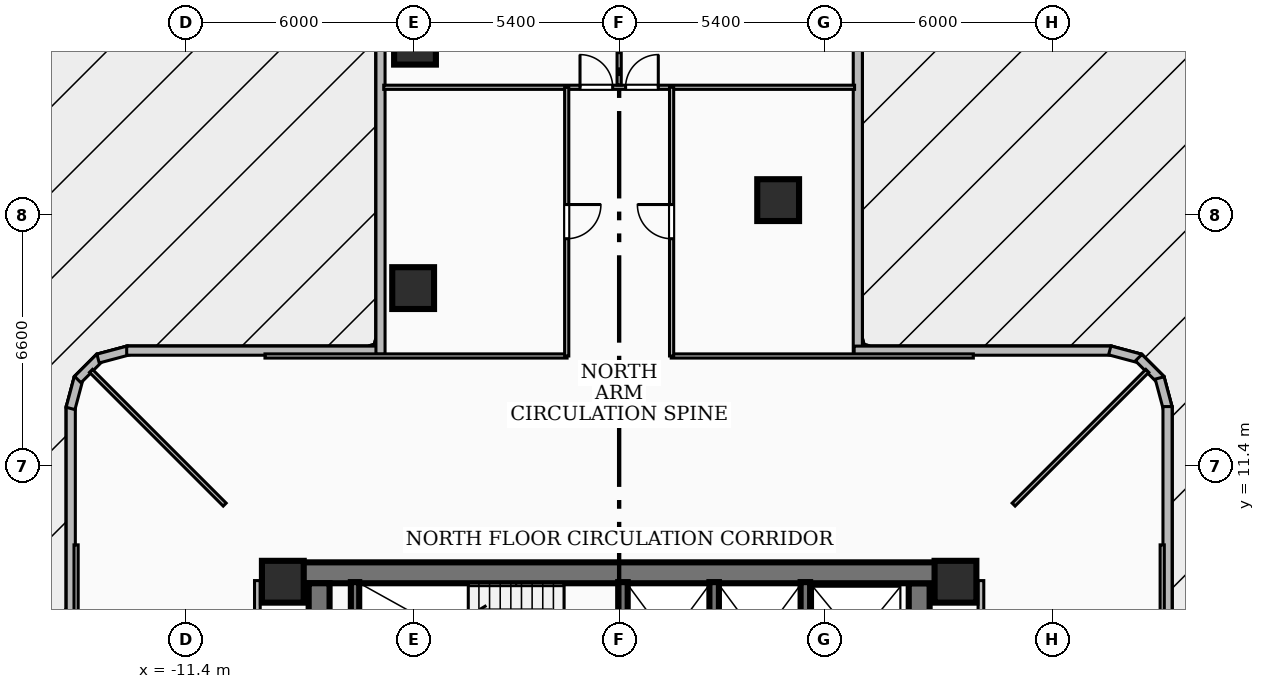
"""IFC4 building model, lengths in metres.
Left out: names, types, materials, properties, quantities, classifications, styles, units other than length and angle.
Written with IfcOpenShell. Run it as: python <this file> out.ifc"""

import sys

from ifc_helpers import new_model, si_unit, direction, frame, frame_2d, origin, origin_2d, place, context, subcontext, project, spatial, rectangle, extrude, element, fill, save


model = new_model("IFC4")
c1 = context("Model", 3, precision=1e-05, world=origin(), true_north=direction((0.0, 1.0)))
c2 = subcontext(c1, "Body", "Model", "MODEL_VIEW")
j1 = project(units=[si_unit("LENGTHUNIT", "METRE"), si_unit("PLANEANGLEUNIT", "RADIAN")], contexts=[c1])
p1 = place(None, origin())
s1 = spatial("IfcSite", under=j1, at=p1, CompositionType="ELEMENT")
p2 = place(p1, origin())
s2 = spatial("IfcBuilding", under=s1, at=p2, CompositionType="ELEMENT")
p3 = place(p2, frame((0.0, 0.0, 24.48)))
s3 = spatial("IfcBuildingStorey", under=s2, at=p3, CompositionType="ELEMENT", Elevation=24.48)
p4 = place(p3, frame((-8.78, 8.585, 0.0), z_axis=(0.0, 0.0, 1.0), x_axis=(1.0, 0.0, 0.0)))
e1 = element("IfcWall", 1, at=p4, inside=s3, PredefinedType="SHEAR", context=c2, shape_type="SweptSolid", body=[
    extrude(rectangle(XDim=17.56, YDim=0.55, at=frame_2d((8.78, 0.0))), origin(), (0.0, 0.0, 1.0), 3.34),
])
for number, where, z_axis, x_axis in (
    (2, (-7.895, 2.025, 0.0), (0.0, 0.0, 1.0), (0.0, 1.0, 0.0)),
    (3, (7.895, 8.31, 0.0), (0.0, 0.0, 1.0), (0.0, -1.0, 0.0)),
):
    element("IfcWall", number, at=place(p3, frame(where, z_axis=z_axis, x_axis=x_axis)), inside=s3, PredefinedType="SHEAR", context=c2, shape_type="SweptSolid", body=[
        extrude(rectangle(XDim=6.285, YDim=0.55, at=frame_2d((3.143, 0.0))), origin(), (0.0, 0.0, 1.0), 3.34),
    ])
p5 = place(p3, frame((-6.95, 5.28, 0.0), z_axis=(0.0, 0.0, 1.0), x_axis=(0.0, 1.0, 0.0)))
e4 = element("IfcWall", 4, at=p5, inside=s3, PredefinedType="SOLIDWALL", context=c2, shape_type="SweptSolid", body=[
    extrude(rectangle(XDim=3.06, YDim=0.22, at=frame_2d((1.53, 0.0))), origin(), (0.0, 0.0, 1.0), 3.34),
])
for number, where, z_axis, x_axis in (
    (5, (0.1, 5.3, 0.0), (0.0, 0.0, 1.0), (0.0, 1.0, 0.0)),
    (6, (2.5, 5.3, 0.0), (0.0, 0.0, 1.0), (0.0, 1.0, 0.0)),
    (7, (4.9, 5.3, 0.0), (0.0, 0.0, 1.0), (0.0, 1.0, 0.0)),
):
    element("IfcWall", number, at=place(p3, frame(where, z_axis=z_axis, x_axis=x_axis)), inside=s3, PredefinedType="SOLIDWALL", context=c2, shape_type="SweptSolid", body=[
        extrude(rectangle(XDim=3.04, YDim=0.25, at=frame_2d((1.52, 0.0))), origin(), (0.0, 0.0, 1.0), 3.34),
    ])
for number, where, z_axis, x_axis in (
    (8, (-8.85, 8.35, 0.0), (0.0, 0.0, 1.0), (1.0, 0.0, 0.0)),
    (9, (8.85, 8.35, 0.0), (0.0, 0.0, 1.0), (1.0, 0.0, 0.0)),
    (10, (4.184, 18.391, 0.0), (0.0, 0.0, 1.0), (1.0, 0.0, 0.0)),
    (11, (-5.421, 16.076, 0.0), (0.0, 0.0, 1.0), (1.0, 0.0, 0.0)),
    (12, (-5.372, 22.507, 0.0), (0.0, 0.0, 1.0), (1.0, 0.0, 0.0)),
):
    element("IfcColumn", number, at=place(p3, frame(where, z_axis=z_axis, x_axis=x_axis)), inside=s3, PredefinedType="COLUMN", context=c2, shape_type="SweptSolid", body=[
        extrude(rectangle(XDim=1.1, YDim=1.1, at=origin_2d()), origin(), (0.0, 0.0, 1.0), 3.6),
    ])
p6 = place(p3, frame((-14.43, 6.184, 0.0), z_axis=(0.0, 0.0, 1.0), x_axis=(0.0, 1.0, 0.0)))
e13 = element("IfcWall", 13, at=p6, inside=s3, PredefinedType="SOLIDWALL", context=c2, shape_type="SweptSolid", body=[
    extrude(rectangle(XDim=6.775, YDim=0.24, at=frame_2d((3.387, 0.0))), origin(), (0.0, 0.0, 1.0), 3.34),
])
p7 = place(p3, frame((-14.436, 12.91, 0.0), z_axis=(0.0, 0.0, 1.0), x_axis=(0.257937227116, 0.966161677396, 0.0)))
e14 = element("IfcWall", 14, at=p7, inside=s3, PredefinedType="SOLIDWALL", context=c2, shape_type="SweptSolid", body=[
    extrude(rectangle(XDim=0.83, YDim=0.24, at=frame_2d((0.415, 0.0))), origin(), (0.0, 0.0, 1.0), 3.34),
])
p8 = place(p3, frame((-14.246, 13.67, 0.0), z_axis=(0.0, 0.0, 1.0), x_axis=(0.707106781187, 0.707106781187, 0.0)))
e15 = element("IfcWall", 15, at=p8, inside=s3, PredefinedType="SOLIDWALL", context=c2, shape_type="SweptSolid", body=[
    extrude(rectangle(XDim=0.815, YDim=0.24, at=frame_2d((0.407, 0.0))), origin(), (0.0, 0.0, 1.0), 3.34),
])
p9 = place(p3, frame((-13.712, 14.222, 0.0), z_axis=(0.0, 0.0, 1.0), x_axis=(0.966161677396, 0.257937227116, 0.0)))
e16 = element("IfcWall", 16, at=p9, inside=s3, PredefinedType="SOLIDWALL", context=c2, shape_type="SweptSolid", body=[
    extrude(rectangle(XDim=0.83, YDim=0.24, at=frame_2d((0.415, 0.0))), origin(), (0.0, 0.0, 1.0), 3.34),
])
p10 = place(p3, frame((-12.959, 14.43, 0.0), z_axis=(0.0, 0.0, 1.0), x_axis=(1.0, 0.0, 0.0)))
e17 = element("IfcWall", 17, at=p10, inside=s3, PredefinedType="SOLIDWALL", context=c2, shape_type="SweptSolid", body=[
    extrude(rectangle(XDim=6.775, YDim=0.24, at=frame_2d((3.387, 0.0))), origin(), (0.0, 0.0, 1.0), 2.421),
])
p11 = place(p3, frame((-6.28, 14.334, 0.0), z_axis=(0.0, 0.0, 1.0), x_axis=(0.0, 1.0, 0.0)))
e18 = element("IfcWall", 18, at=p11, inside=s3, PredefinedType="SOLIDWALL", context=c2, shape_type="SweptSolid", body=[
    extrude(rectangle(XDim=13.475, YDim=0.24, at=frame_2d((6.738, 0.0))), origin(), (0.0, 0.0, 1.0), 2.421),
])
p12 = place(p3, frame((6.28, 27.809, 0.0), z_axis=(0.0, 0.0, 1.0), x_axis=(0.0, -1.0, 0.0)))
e19 = element("IfcWall", 19, at=p12, inside=s3, PredefinedType="SOLIDWALL", context=c2, shape_type="SweptSolid", body=[
    extrude(rectangle(XDim=13.475, YDim=0.24, at=frame_2d((6.738, 0.0))), origin(), (0.0, 0.0, 1.0), 3.34),
])
p13 = place(p12, frame((1.1, 0.0, 0.85)))
e20 = element("IfcOpeningElement", 20, at=p13, cuts=e19, PredefinedType="OPENING", context=c2, shape_type="SweptSolid", body=[
    extrude(rectangle(XDim=2.7, YDim=1.85, at=frame_2d((1.35, 0.925))), frame((0.0, 0.13, 0.0), z_axis=(0.0, -1.0, 0.0), x_axis=(1.0, 0.0, 0.0)), (0.0, 0.0, 1.0), 0.26),
])
p14 = place(p3, frame((6.184, 14.43, 0.0), z_axis=(0.0, 0.0, 1.0), x_axis=(1.0, 0.0, 0.0)))
e21 = element("IfcWall", 21, at=p14, inside=s3, PredefinedType="SOLIDWALL", context=c2, shape_type="SweptSolid", body=[
    extrude(rectangle(XDim=6.775, YDim=0.24, at=frame_2d((3.387, 0.0))), origin(), (0.0, 0.0, 1.0), 3.34),
])
p15 = place(p3, frame((12.91, 14.436, 0.0), z_axis=(0.0, 0.0, 1.0), x_axis=(0.966161677396, -0.257937227116, 0.0)))
e22 = element("IfcWall", 22, at=p15, inside=s3, PredefinedType="SOLIDWALL", context=c2, shape_type="SweptSolid", body=[
    extrude(rectangle(XDim=0.83, YDim=0.24, at=frame_2d((0.415, 0.0))), origin(), (0.0, 0.0, 1.0), 3.34),
])
p16 = place(p3, frame((13.67, 14.246, 0.0), z_axis=(0.0, 0.0, 1.0), x_axis=(0.707106781187, -0.707106781187, 0.0)))
e23 = element("IfcWall", 23, at=p16, inside=s3, PredefinedType="SOLIDWALL", context=c2, shape_type="SweptSolid", body=[
    extrude(rectangle(XDim=0.815, YDim=0.24, at=frame_2d((0.407, 0.0))), origin(), (0.0, 0.0, 1.0), 3.34),
])
p17 = place(p3, frame((14.222, 13.712, 0.0), z_axis=(0.0, 0.0, 1.0), x_axis=(0.257937227116, -0.966161677396, 0.0)))
e24 = element("IfcWall", 24, at=p17, inside=s3, PredefinedType="SOLIDWALL", context=c2, shape_type="SweptSolid", body=[
    extrude(rectangle(XDim=0.83, YDim=0.24, at=frame_2d((0.415, 0.0))), origin(), (0.0, 0.0, 1.0), 3.34),
])
p18 = place(p3, frame((14.43, 12.959, 0.0), z_axis=(0.0, 0.0, 1.0), x_axis=(0.0, -1.0, 0.0)))
e25 = element("IfcWall", 25, at=p18, inside=s3, PredefinedType="SOLIDWALL", context=c2, shape_type="SweptSolid", body=[
    extrude(rectangle(XDim=6.775, YDim=0.24, at=frame_2d((3.387, 0.0))), origin(), (0.0, 0.0, 1.0), 3.34),
])
for number, where, z_axis, x_axis in (
    (26, (-9.52, 1.75, 0.0), (0.0, 0.0, 1.0), (0.0, 1.0, 0.0)),
    (27, (9.52, 1.75, 0.0), (0.0, 0.0, 1.0), (0.0, 1.0, 0.0)),
):
    element("IfcWall", number, at=place(p3, frame(where, z_axis=z_axis, x_axis=x_axis)), inside=s3, PredefinedType="PARTITIONING", context=c2, shape_type="SweptSolid", body=[
        extrude(rectangle(XDim=6.63, YDim=0.15, at=frame_2d((3.315, 0.0))), origin(), (0.0, 0.0, 1.0), 2.421),
    ])
for number, where, z_axis, x_axis in (
    (28, (10.38, 10.38, 0.0), (0.0, 0.0, 1.0), (0.707, 0.707, 0.0)),
    (29, (-10.38, 10.38, 0.0), (0.0, 0.0, 1.0), (-0.707, 0.707, 0.0)),
):
    element("IfcWall", number, at=place(p3, frame(where, z_axis=z_axis, x_axis=x_axis)), inside=s3, PredefinedType="PARTITIONING", context=c2, shape_type="SweptSolid", body=[
        extrude(rectangle(XDim=4.975, YDim=0.11, at=frame_2d((2.488, 0.0))), origin(), (0.0, 0.0, 1.0), 3.34),
    ])
for number, where, z_axis, x_axis in (
    (30, (14.29, 1.37, 0.0), (0.0, 0.0, 1.0), (0.0, 1.0, 0.0)),
    (31, (-1.37, 14.29, 0.0), (0.0, 0.0, 1.0), (-1.0, 0.0, 0.0)),
    (32, (9.32, 14.29, 0.0), (0.0, 0.0, 1.0), (-1.0, 0.0, 0.0)),
):
    element("IfcWall", number, at=place(p3, frame(where, z_axis=z_axis, x_axis=x_axis)), inside=s3, PredefinedType="PARTITIONING", context=c2, shape_type="SweptSolid", body=[
        extrude(rectangle(XDim=7.95, YDim=0.11, at=frame_2d((3.975, 0.0))), origin(), (0.0, 0.0, 1.0), 2.421),
    ])
p19 = place(p3, frame((-1.38, 21.36, 0.0), z_axis=(0.0, 0.0, 1.0), x_axis=(0.0, -1.0, 0.0)))
e33 = element("IfcWall", 33, at=p19, inside=s3, PredefinedType="PARTITIONING", context=c2, shape_type="SweptSolid", body=[
    extrude(rectangle(XDim=7.07, YDim=0.11, at=frame_2d((3.535, 0.0))), origin(), (0.0, 0.0, 1.0), 2.869),
])
p20 = place(p19, frame((3.085, 0.0, 0.0)))
e34 = element("IfcOpeningElement", 34, at=p20, cuts=e33, PredefinedType="OPENING", context=c2, shape_type="SweptSolid", body=[
    extrude(rectangle(XDim=0.9, YDim=2.06, at=frame_2d((0.45, 1.03))), frame((0.0, 0.065, 0.0), z_axis=(0.0, -1.0, 0.0), x_axis=(1.0, 0.0, 0.0)), (0.0, 0.0, 1.0), 0.13),
])
p21 = place(p3, frame((1.38, 14.29, 0.0), z_axis=(0.0, 0.0, 1.0), x_axis=(0.0, 1.0, 0.0)))
e35 = element("IfcWall", 35, at=p21, inside=s3, PredefinedType="PARTITIONING", context=c2, shape_type="SweptSolid", body=[
    extrude(rectangle(XDim=7.07, YDim=0.11, at=frame_2d((3.535, 0.0))), origin(), (0.0, 0.0, 1.0), 2.869),
])
p22 = place(p21, frame((3.085, 0.0, 0.0)))
e36 = element("IfcOpeningElement", 36, at=p22, cuts=e35, PredefinedType="OPENING", context=c2, shape_type="SweptSolid", body=[
    extrude(rectangle(XDim=0.9, YDim=2.06, at=frame_2d((0.45, 1.03))), frame((0.0, 0.065, 0.0), z_axis=(0.0, -1.0, 0.0), x_axis=(1.0, 0.0, 0.0)), (0.0, 0.0, 1.0), 0.13),
])
p23 = place(p3, frame((0.0, 21.42, 0.0), z_axis=(0.0, 0.0, 1.0), x_axis=(0.0, 1.0, 0.0)))
e37 = element("IfcWall", 37, at=p23, inside=s3, PredefinedType="PARTITIONING", context=c2, shape_type="SweptSolid", body=[
    extrude(rectangle(XDim=7.775, YDim=0.11, at=frame_2d((3.888, 0.0))), origin(), (0.0, 0.0, 1.0), 2.72),
])
p24 = place(p3, frame((-6.195, 21.36, 0.0), z_axis=(0.0, 0.0, 1.0), x_axis=(1.0, 0.0, 0.0)))
e38 = element("IfcWall", 38, at=p24, inside=s3, PredefinedType="PARTITIONING", context=c2, shape_type="SweptSolid", body=[
    extrude(rectangle(XDim=12.39, YDim=0.11, at=frame_2d((6.195, 0.0))), origin(), (0.0, 0.0, 1.0), 2.421),
])
p25 = place(p24, frame((6.365, 0.0, 0.0)))
e39 = element("IfcOpeningElement", 39, at=p25, cuts=e38, PredefinedType="OPENING", context=c2, shape_type="SweptSolid", body=[
    extrude(rectangle(XDim=0.86, YDim=2.04, at=frame_2d((0.43, 1.02))), frame((0.0, 0.065, 0.0), z_axis=(0.0, -1.0, 0.0), x_axis=(1.0, 0.0, 0.0)), (0.0, 0.0, 1.0), 0.13),
])
p26 = place(p24, frame((5.165, 0.0, 0.0)))
e40 = element("IfcOpeningElement", 40, at=p26, cuts=e38, PredefinedType="OPENING", context=c2, shape_type="SweptSolid", body=[
    extrude(rectangle(XDim=0.86, YDim=2.04, at=frame_2d((0.43, 1.02))), frame((0.0, 0.065, 0.0), z_axis=(0.0, -1.0, 0.0), x_axis=(1.0, 0.0, 0.0)), (0.0, 0.0, 1.0), 0.13),
])
p27 = place(p3, frame((-14.29, 9.32, 0.0), z_axis=(0.0, 0.0, 1.0), x_axis=(0.0, -1.0, 0.0)))
e41 = element("IfcWall", 41, at=p27, inside=s3, PredefinedType="PARTITIONING", context=c2, shape_type="SweptSolid", body=[
    extrude(rectangle(XDim=7.95, YDim=0.11, at=frame_2d((3.975, 0.0))), origin(), (0.0, 0.0, 1.0), 2.421),
])
p28 = place(p20, origin())
e42 = element("IfcDoor", 42, at=p28, inside=s3, OperationType="SINGLE_SWING_LEFT", PredefinedType="DOOR", context=c2, shape_type="SweptSolid", body=[
    extrude(rectangle(XDim=0.9, YDim=2.06, at=frame_2d((0.45, 1.03))), frame((0.0, 0.025, 0.0), z_axis=(0.0, -1.0, 0.0), x_axis=(1.0, 0.0, 0.0)), (0.0, 0.0, 1.0), 0.05),
])
fill(e34, e42)
p29 = place(p22, origin())
e43 = element("IfcDoor", 43, at=p29, inside=s3, OperationType="SINGLE_SWING_RIGHT", PredefinedType="DOOR", context=c2, shape_type="SweptSolid", body=[
    extrude(rectangle(XDim=0.9, YDim=2.06, at=frame_2d((0.45, 1.03))), frame((0.0, 0.025, 0.0), z_axis=(0.0, -1.0, 0.0), x_axis=(1.0, 0.0, 0.0)), (0.0, 0.0, 1.0), 0.05),
])
fill(e36, e43)
p30 = place(p25, origin())
e44 = element("IfcDoor", 44, at=p30, inside=s3, OperationType="SINGLE_SWING_RIGHT", PredefinedType="DOOR", context=c2, shape_type="SweptSolid", body=[
    extrude(rectangle(XDim=0.86, YDim=2.04, at=frame_2d((0.43, 1.02))), frame((0.0, 0.025, 0.0), z_axis=(0.0, -1.0, 0.0), x_axis=(1.0, 0.0, 0.0)), (0.0, 0.0, 1.0), 0.05),
])
fill(e39, e44)
p31 = place(p26, origin())
e45 = element("IfcDoor", 45, at=p31, inside=s3, OperationType="SINGLE_SWING_LEFT", PredefinedType="DOOR", context=c2, shape_type="SweptSolid", body=[
    extrude(rectangle(XDim=0.86, YDim=2.04, at=frame_2d((0.43, 1.02))), frame((0.0, 0.025, 0.0), z_axis=(0.0, -1.0, 0.0), x_axis=(1.0, 0.0, 0.0)), (0.0, 0.0, 1.0), 0.05),
])
fill(e40, e45)
save(model, sys.argv[1])
